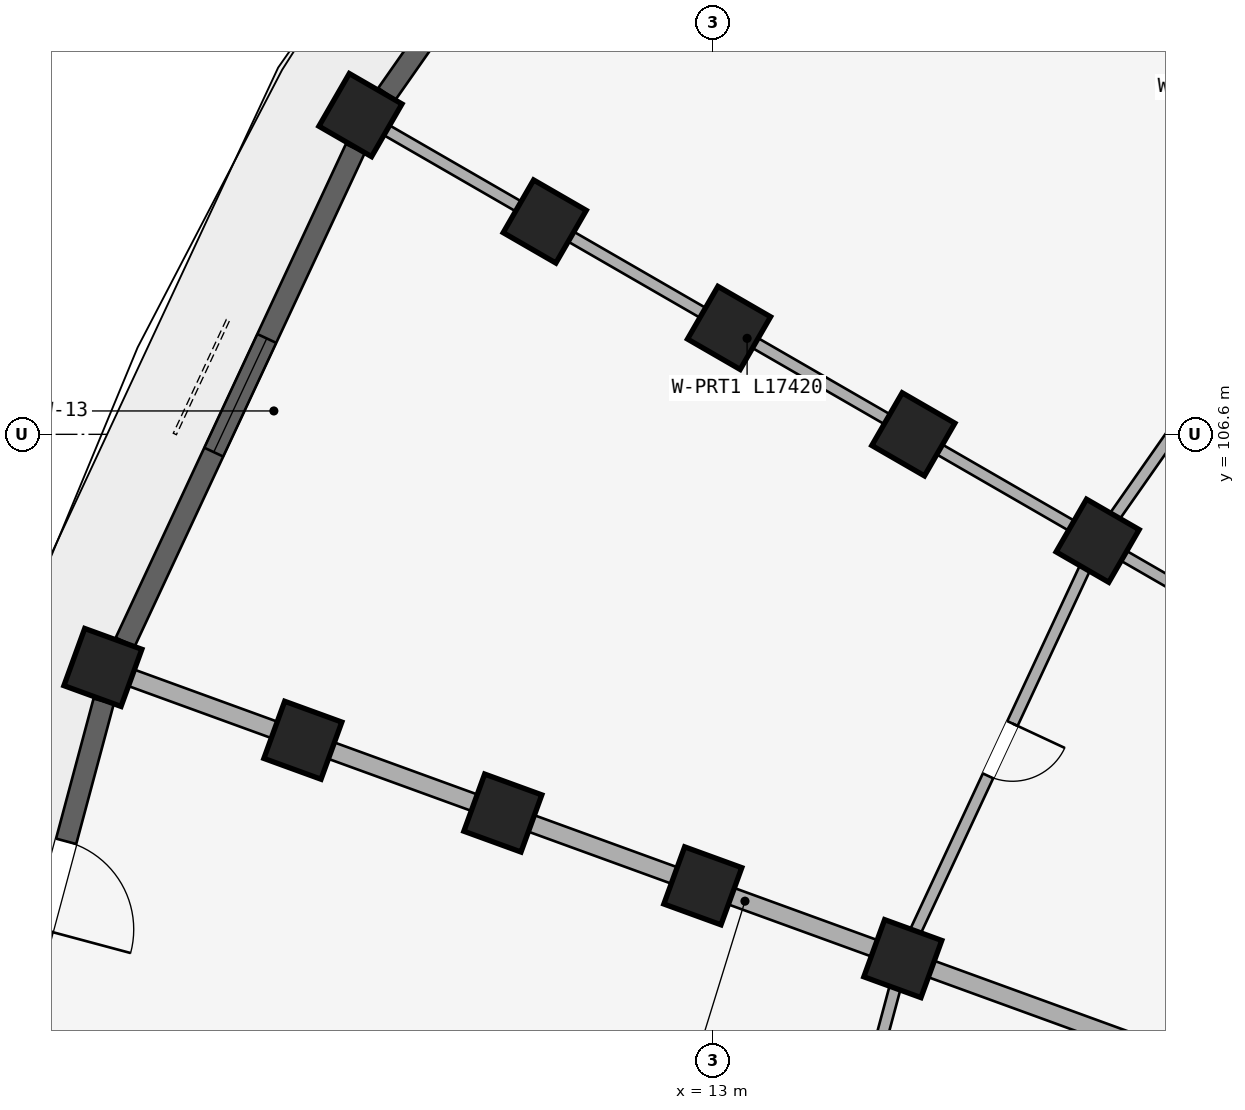
"""IFC4 building model, lengths in metres.
Left out: names, types, materials, properties, quantities, classifications, styles, units other than length and angle.
Written with IfcOpenShell. Run it as: python <this file> out.ifc"""

import sys

from ifc_helpers import new_model, si_unit, direction, frame, frame_2d, origin, origin_2d, place, context, subcontext, project, spatial, rectangle, extrude, element, fill, save


model = new_model("IFC4")
c1 = context("Model", 3, precision=1e-05, world=origin(), true_north=direction((0.0, 1.0)))
c2 = subcontext(c1, "Body", "Model", "MODEL_VIEW")
j1 = project(units=[si_unit("LENGTHUNIT", "METRE"), si_unit("PLANEANGLEUNIT", "RADIAN")], contexts=[c1])
p1 = place(None, origin())
s1 = spatial("IfcSite", under=j1, at=p1, CompositionType="ELEMENT")
p2 = place(p1, origin())
s2 = spatial("IfcBuilding", under=s1, at=p2, CompositionType="ELEMENT")
p3 = place(p2, frame((0.0, 0.0, 8.7)))
s3 = spatial("IfcBuildingStorey", under=s2, at=p3, CompositionType="ELEMENT", Elevation=8.7)
for number, where, z_axis, x_axis in (
    (1, (19.397, 111.969, 0.0), (0.0, 0.0, 1.0), (0.643, 0.766, 0.0)),
    (2, (18.062, 105.2, 0.0), (0.0, 0.0, 1.0), (0.5, 0.866, 0.0)),
    (3, (15.637, 106.6, 0.0), (0.0, 0.0, 1.0), (0.5, 0.866, 0.0)),
    (4, (13.213, 108.0, 0.0), (0.0, 0.0, 1.0), (0.5, 0.866, 0.0)),
    (5, (10.788, 109.4, 0.0), (0.0, 0.0, 1.0), (0.5, 0.866, 0.0)),
    (6, (8.363, 110.8, 0.0), (0.0, 0.0, 1.0), (0.5, 0.866, 0.0)),
    (7, (15.499, 99.702, 0.0), (0.0, 0.0, 1.0), (0.342, 0.94, 0.0)),
    (8, (12.868, 100.66, 0.0), (0.0, 0.0, 1.0), (0.342, 0.94, 0.0)),
    (9, (10.236, 101.618, 0.0), (0.0, 0.0, 1.0), (0.342, 0.94, 0.0)),
    (10, (7.605, 102.575, 0.0), (0.0, 0.0, 1.0), (0.342, 0.94, 0.0)),
    (11, (4.974, 103.533, 0.0), (0.0, 0.0, 1.0), (0.342, 0.94, 0.0)),
):
    element("IfcColumn", number, at=place(p3, frame(where, z_axis=z_axis, x_axis=x_axis)), inside=s3, PredefinedType="COLUMN", context=c2, shape_type="SweptSolid", body=[
        extrude(rectangle(XDim=0.8, YDim=0.8, at=origin_2d()), origin(), (0.0, 0.0, 1.0), 2.93),
    ])
p4 = place(p3, frame((30.009, 109.479, 0.0), z_axis=(0.0, 0.0, 1.0), x_axis=(-0.642784757967, 0.766046835987, 0.0)))
e12 = element("IfcWall", 12, at=p4, inside=s3, PredefinedType="PARTITIONING", context=c2, shape_type="SweptSolid", body=[
    extrude(rectangle(XDim=17.42, YDim=0.15, at=frame_2d((8.71, 0.0))), origin(), (0.0, 0.0, 1.0), 2.372),
])
p5 = place(p4, frame((4.45, 0.0, 0.0)))
e13 = element("IfcOpeningElement", 13, at=p5, cuts=e12, PredefinedType="OPENING", context=c2, shape_type="SweptSolid", body=[
    extrude(rectangle(XDim=0.8, YDim=2.1, at=frame_2d((0.4, 1.05))), frame((0.0, 0.085, 0.0), z_axis=(0.0, -1.0, 0.0), x_axis=(1.0, 0.0, 0.0)), (0.0, 0.0, 1.0), 0.17),
])
p6 = place(p3, frame((26.521, 105.991, 0.0), z_axis=(0.0, 0.0, 1.0), x_axis=(-0.766046835987, 0.642784757967, 0.0)))
e14 = element("IfcWall", 14, at=p6, inside=s3, PredefinedType="STANDARD", context=c2, shape_type="SweptSolid", body=[
    extrude(rectangle(XDim=17.42, YDim=0.23, at=frame_2d((8.71, 0.0))), origin(), (0.0, 0.0, 1.0), 2.372),
])
p7 = place(p3, frame((23.691, 101.95, 0.0), z_axis=(0.0, 0.0, 1.0), x_axis=(-0.866026648973, 0.499997843263, 0.0)))
e15 = element("IfcWall", 15, at=p7, inside=s3, PredefinedType="PARTITIONING", context=c2, shape_type="SweptSolid", body=[
    extrude(rectangle(XDim=17.42, YDim=0.15, at=frame_2d((8.71, 0.0))), origin(), (0.0, 0.0, 1.0), 2.372),
])
p8 = place(p7, frame((4.45, 0.0, 0.0)))
e16 = element("IfcOpeningElement", 16, at=p8, cuts=e15, PredefinedType="OPENING", context=c2, shape_type="SweptSolid", body=[
    extrude(rectangle(XDim=0.8, YDim=2.1, at=frame_2d((0.4, 1.05))), frame((0.0, 0.085, 0.0), z_axis=(0.0, -1.0, 0.0), x_axis=(1.0, 0.0, 0.0)), (0.0, 0.0, 1.0), 0.17),
])
p9 = place(p3, frame((21.607, 97.479, 0.0), z_axis=(0.0, 0.0, 1.0), x_axis=(-0.939691901159, 0.342022120477, 0.0)))
e17 = element("IfcWall", 17, at=p9, inside=s3, PredefinedType="STANDARD", context=c2, shape_type="SweptSolid", body=[
    extrude(rectangle(XDim=17.42, YDim=0.23, at=frame_2d((8.71, 0.0))), origin(), (0.0, 0.0, 1.0), 2.372),
])
p10 = place(p3, frame((21.542, 110.169, 0.0), z_axis=(0.0, 0.0, 1.0), x_axis=(-0.573594691504, -0.81913926159, 0.0)))
e18 = element("IfcWall", 18, at=p10, inside=s3, PredefinedType="PLUMBINGWALL", context=c2, shape_type="SweptSolid", body=[
    extrude(rectangle(XDim=6.066, YDim=0.15, at=frame_2d((3.033, 0.0))), origin(), (0.0, 0.0, 1.0), 2.372),
])
p11 = place(p10, frame((2.613, 0.0, 0.0)))
e19 = element("IfcOpeningElement", 19, at=p11, cuts=e18, PredefinedType="OPENING", context=c2, shape_type="SweptSolid", body=[
    extrude(rectangle(XDim=0.84, YDim=2.1, at=frame_2d((0.42, 1.05))), frame((0.0, 0.085, 0.0), z_axis=(0.0, -1.0, 0.0), x_axis=(1.0, 0.0, 0.0)), (0.0, 0.0, 1.0), 0.17),
])
p12 = place(p3, frame((18.062, 105.2, 0.0), z_axis=(0.0, 0.0, 1.0), x_axis=(-0.42260781991, -0.906312656069, 0.0)))
e20 = element("IfcWall", 20, at=p12, inside=s3, PredefinedType="PLUMBINGWALL", context=c2, shape_type="SweptSolid", body=[
    extrude(rectangle(XDim=6.066, YDim=0.15, at=frame_2d((3.033, 0.0))), origin(), (0.0, 0.0, 1.0), 2.372),
])
p13 = place(p12, frame((2.653, 0.0, 0.0)))
e21 = element("IfcOpeningElement", 21, at=p13, cuts=e20, PredefinedType="OPENING", context=c2, shape_type="SweptSolid", body=[
    extrude(rectangle(XDim=0.76, YDim=2.05, at=frame_2d((0.38, 1.025))), frame((0.0, 0.085, 0.0), z_axis=(0.0, -1.0, 0.0), x_axis=(1.0, 0.0, 0.0)), (0.0, 0.0, 1.0), 0.17),
])
p14 = place(p3, frame((15.499, 99.702, 0.0), z_axis=(0.0, 0.0, 1.0), x_axis=(-0.258827283048, -0.965923618901, 0.0)))
e22 = element("IfcWall", 22, at=p14, inside=s3, PredefinedType="PLUMBINGWALL", context=c2, shape_type="SweptSolid", body=[
    extrude(rectangle(XDim=6.066, YDim=0.15, at=frame_2d((3.033, 0.0))), origin(), (0.0, 0.0, 1.0), 2.372),
])
p15 = place(p14, frame((2.633, 0.0, 0.0)))
e23 = element("IfcOpeningElement", 23, at=p15, cuts=e22, PredefinedType="OPENING", context=c2, shape_type="SweptSolid", body=[
    extrude(rectangle(XDim=0.8, YDim=2.1, at=frame_2d((0.4, 1.05))), frame((0.0, 0.085, 0.0), z_axis=(0.0, -1.0, 0.0), x_axis=(1.0, 0.0, 0.0)), (0.0, 0.0, 1.0), 0.17),
])
p16 = place(p3, frame((12.819, 116.947, 0.0), z_axis=(0.0, 0.0, 1.0), x_axis=(-0.573562972382, -0.819161471697, 0.0)))
e24 = element("IfcWall", 24, at=p16, inside=s3, PredefinedType="STANDARD", context=c2, shape_type="SweptSolid", body=[
    extrude(rectangle(XDim=7.164, YDim=0.275, at=frame_2d((3.582, 0.0))), origin(), (0.0, 0.0, 1.0), 2.472),
])
p17 = place(p16, frame((2.682, 0.0, 0.622)))
e25 = element("IfcOpeningElement", 25, at=p17, cuts=e24, PredefinedType="OPENING", context=c2, shape_type="SweptSolid", body=[
    extrude(rectangle(XDim=1.8, YDim=1.65, at=frame_2d((0.9, 0.825))), frame((0.0, 0.147, 0.0), z_axis=(0.0, -1.0, 0.0), x_axis=(1.0, 0.0, 0.0)), (0.0, 0.0, 1.0), 0.295),
])
p18 = place(p3, frame((8.296, 110.36, 0.0), z_axis=(0.0, 0.0, 1.0), x_axis=(-0.422633596215, -0.906300636296, 0.0)))
e26 = element("IfcWall", 26, at=p18, inside=s3, PredefinedType="STANDARD", context=c2, shape_type="SweptSolid", body=[
    extrude(rectangle(XDim=7.164, YDim=0.275, at=frame_2d((3.582, 0.0))), origin(), (0.0, 0.0, 1.0), 2.472),
])
p19 = place(p18, frame((2.757, 0.0, 0.522)))
e27 = element("IfcOpeningElement", 27, at=p19, cuts=e26, PredefinedType="OPENING", context=c2, shape_type="SweptSolid", body=[
    extrude(rectangle(XDim=1.65, YDim=1.75, at=frame_2d((0.825, 0.875))), frame((0.0, 0.147, 0.0), z_axis=(0.0, -1.0, 0.0), x_axis=(1.0, 0.0, 0.0)), (0.0, 0.0, 1.0), 0.295),
])
p20 = place(p3, frame((4.984, 103.088, 0.0), z_axis=(0.0, 0.0, 1.0), x_axis=(-0.258826933296, -0.965923712619, 0.0)))
e28 = element("IfcWall", 28, at=p20, inside=s3, PredefinedType="STANDARD", context=c2, shape_type="SweptSolid", body=[
    extrude(rectangle(XDim=7.164, YDim=0.275, at=frame_2d((3.582, 0.0))), origin(), (0.0, 0.0, 1.0), 2.472),
])
p21 = place(p20, frame((4.69, 0.0, 0.322)))
e29 = element("IfcOpeningElement", 29, at=p21, cuts=e28, PredefinedType="OPENING", context=c2, shape_type="SweptSolid", body=[
    extrude(rectangle(XDim=1.2, YDim=1.5, at=frame_2d((0.6, 0.75))), frame((0.0, 0.147, 0.0), z_axis=(0.0, -1.0, 0.0), x_axis=(1.0, 0.0, 0.0)), (0.0, 0.0, 1.0), 0.295),
])
p22 = place(p20, frame((1.907, 0.0, 0.0)))
e30 = element("IfcOpeningElement", 30, at=p22, cuts=e28, PredefinedType="OPENING", context=c2, shape_type="SweptSolid", body=[
    extrude(rectangle(XDim=1.2, YDim=2.15, at=frame_2d((0.6, 1.075))), frame((0.0, 0.147, 0.0), z_axis=(0.0, -1.0, 0.0), x_axis=(1.0, 0.0, 0.0)), (0.0, 0.0, 1.0), 0.295),
])
p23 = place(p19, origin())
e31 = element("IfcWindow", 31, at=p23, inside=s3, PartitioningType="DOUBLE_PANEL_VERTICAL", PredefinedType="WINDOW", context=c2, shape_type="SweptSolid", body=[
    extrude(rectangle(XDim=1.65, YDim=1.75, at=frame_2d((0.825, 0.875))), frame((0.0, 0.03, 0.0), z_axis=(0.0, -1.0, 0.0), x_axis=(1.0, 0.0, 0.0)), (0.0, 0.0, 1.0), 0.06),
])
fill(e27, e31)
p24 = place(p13, frame((0.76, 0.0, 0.0), z_axis=(0.0, 0.0, 1.0), x_axis=(-1.0, 0.0, 0.0)))
e32 = element("IfcDoor", 32, at=p24, inside=s3, OperationType="SINGLE_SWING_RIGHT", PredefinedType="DOOR", context=c2, shape_type="SweptSolid", body=[
    extrude(rectangle(XDim=0.76, YDim=2.05, at=frame_2d((0.38, 1.025))), frame((0.0, 0.025, 0.0), z_axis=(0.0, -1.0, 0.0), x_axis=(1.0, 0.0, 0.0)), (0.0, 0.0, 1.0), 0.05),
])
fill(e21, e32)
p25 = place(p22, frame((1.2, 0.0, 0.0), z_axis=(0.0, 0.0, 1.0), x_axis=(-1.0, 0.0, 0.0)))
e33 = element("IfcDoor", 33, at=p25, inside=s3, OperationType="SINGLE_SWING_LEFT", PredefinedType="DOOR", context=c2, shape_type="SweptSolid", body=[
    extrude(rectangle(XDim=1.2, YDim=2.15, at=frame_2d((0.6, 1.075))), frame((0.0, 0.025, 0.0), z_axis=(0.0, -1.0, 0.0), x_axis=(1.0, 0.0, 0.0)), (0.0, 0.0, 1.0), 0.05),
])
fill(e30, e33)
save(model, sys.argv[1])
